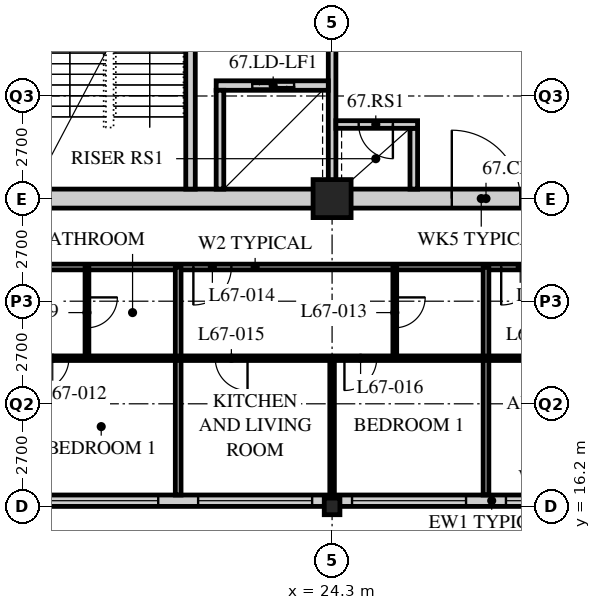
"""IFC4 building model, lengths in metres.
Left out: names, types, materials, properties, quantities, classifications, styles, units other than length and angle.
Written with IfcOpenShell. Run it as: python <this file> out.ifc"""

import sys

from ifc_helpers import new_model, si_unit, direction, frame, frame_2d, origin, origin_2d, place, context, subcontext, project, spatial, rectangle, hollow_rectangle, i_section, extrude, element, fill, save


model = new_model("IFC4")
c1 = context("Model", 3, precision=1e-05, world=origin(), true_north=direction((0.0, 1.0)))
c2 = subcontext(c1, "Body", "Model", "MODEL_VIEW")
j1 = project(units=[si_unit("LENGTHUNIT", "METRE"), si_unit("PLANEANGLEUNIT", "RADIAN")], contexts=[c1])
p1 = place(None, origin())
s1 = spatial("IfcSite", under=j1, at=p1, CompositionType="ELEMENT")
p2 = place(p1, origin())
s2 = spatial("IfcBuilding", under=s1, at=p2, CompositionType="ELEMENT")
p3 = place(p2, frame((0.0, 0.0, 261.9)))
s3 = spatial("IfcBuildingStorey", under=s2, at=p3, CompositionType="ELEMENT", Elevation=261.9)
p4 = place(p3, frame((24.3, 16.2, 0.0), z_axis=(0.0, 0.0, 1.0), x_axis=(1.0, 0.0, 0.0)))
e1 = element("IfcColumn", 1, at=p4, inside=s3, PredefinedType="COLUMN", context=c2, shape_type="SweptSolid", body=[
    extrude(i_section(OverallWidth=0.412, OverallDepth=0.437, WebThickness=0.036, FlangeThickness=0.058, FilletRadius=0.015, at=origin_2d()), origin(), (0.0, 0.0, 1.0), 3.9),
])
p5 = place(p3, frame((24.3, 24.3, 0.0), z_axis=(0.0, 0.0, 1.0), x_axis=(1.0, 0.0, 0.0)))
e2 = element("IfcColumn", 2, at=p5, inside=s3, PredefinedType="COLUMN", context=c2, shape_type="SweptSolid", body=[
    extrude(hollow_rectangle(XDim=1.0, YDim=1.0, WallThickness=0.1, at=origin_2d()), origin(), (0.0, 0.0, 1.0), 3.9),
])
p6 = place(p3, frame((8.4, 16.35, 0.0), z_axis=(0.0, 0.0, 1.0), x_axis=(1.0, 0.0, 0.0)))
e3 = element("IfcWall", 3, at=p6, inside=s3, PredefinedType="SOLIDWALL", context=c2, shape_type="SweptSolid", body=[
    extrude(rectangle(XDim=40.2, YDim=0.3, at=frame_2d((20.1, 0.0))), origin(), (0.0, 0.0, 1.0), 3.69),
])
p7 = place(p6, frame((0.225, 0.0, 0.6)))
e4 = element("IfcOpeningElement", 4, at=p7, cuts=e3, PredefinedType="OPENING", context=c2, shape_type="SweptSolid", body=[
    extrude(rectangle(XDim=3.0, YDim=2.4, at=frame_2d((1.5, 1.2))), frame((0.0, 0.16, 0.0), z_axis=(0.0, -1.0, 0.0), x_axis=(1.0, 0.0, 0.0)), (0.0, 0.0, 1.0), 0.32),
])
p8 = place(p6, frame((4.275, 0.0, 0.6)))
e5 = element("IfcOpeningElement", 5, at=p8, cuts=e3, PredefinedType="OPENING", context=c2, shape_type="SweptSolid", body=[
    extrude(rectangle(XDim=3.0, YDim=2.4, at=frame_2d((1.5, 1.2))), frame((0.0, 0.16, 0.0), z_axis=(0.0, -1.0, 0.0), x_axis=(1.0, 0.0, 0.0)), (0.0, 0.0, 1.0), 0.32),
])
p9 = place(p6, frame((8.325, 0.0, 0.6)))
e6 = element("IfcOpeningElement", 6, at=p9, cuts=e3, PredefinedType="OPENING", context=c2, shape_type="SweptSolid", body=[
    extrude(rectangle(XDim=3.0, YDim=2.4, at=frame_2d((1.5, 1.2))), frame((0.0, 0.16, 0.0), z_axis=(0.0, -1.0, 0.0), x_axis=(1.0, 0.0, 0.0)), (0.0, 0.0, 1.0), 0.32),
])
p10 = place(p6, frame((12.375, 0.0, 0.6)))
e7 = element("IfcOpeningElement", 7, at=p10, cuts=e3, PredefinedType="OPENING", context=c2, shape_type="SweptSolid", body=[
    extrude(rectangle(XDim=3.0, YDim=2.4, at=frame_2d((1.5, 1.2))), frame((0.0, 0.16, 0.0), z_axis=(0.0, -1.0, 0.0), x_axis=(1.0, 0.0, 0.0)), (0.0, 0.0, 1.0), 0.32),
])
p11 = place(p6, frame((16.425, 0.0, 0.6)))
e8 = element("IfcOpeningElement", 8, at=p11, cuts=e3, PredefinedType="OPENING", context=c2, shape_type="SweptSolid", body=[
    extrude(rectangle(XDim=3.0, YDim=2.4, at=frame_2d((1.5, 1.2))), frame((0.0, 0.16, 0.0), z_axis=(0.0, -1.0, 0.0), x_axis=(1.0, 0.0, 0.0)), (0.0, 0.0, 1.0), 0.32),
])
p12 = place(p6, frame((20.475, 0.0, 0.6)))
e9 = element("IfcOpeningElement", 9, at=p12, cuts=e3, PredefinedType="OPENING", context=c2, shape_type="SweptSolid", body=[
    extrude(rectangle(XDim=3.0, YDim=2.4, at=frame_2d((1.5, 1.2))), frame((0.0, 0.16, 0.0), z_axis=(0.0, -1.0, 0.0), x_axis=(1.0, 0.0, 0.0)), (0.0, 0.0, 1.0), 0.32),
])
p13 = place(p6, frame((24.525, 0.0, 0.6)))
e10 = element("IfcOpeningElement", 10, at=p13, cuts=e3, PredefinedType="OPENING", context=c2, shape_type="SweptSolid", body=[
    extrude(rectangle(XDim=3.0, YDim=2.4, at=frame_2d((1.5, 1.2))), frame((0.0, 0.16, 0.0), z_axis=(0.0, -1.0, 0.0), x_axis=(1.0, 0.0, 0.0)), (0.0, 0.0, 1.0), 0.32),
])
p14 = place(p6, frame((28.575, 0.0, 0.6)))
e11 = element("IfcOpeningElement", 11, at=p14, cuts=e3, PredefinedType="OPENING", context=c2, shape_type="SweptSolid", body=[
    extrude(rectangle(XDim=3.0, YDim=2.4, at=frame_2d((1.5, 1.2))), frame((0.0, 0.16, 0.0), z_axis=(0.0, -1.0, 0.0), x_axis=(1.0, 0.0, 0.0)), (0.0, 0.0, 1.0), 0.32),
])
p15 = place(p6, frame((32.625, 0.0, 0.6)))
e12 = element("IfcOpeningElement", 12, at=p15, cuts=e3, PredefinedType="OPENING", context=c2, shape_type="SweptSolid", body=[
    extrude(rectangle(XDim=3.0, YDim=2.4, at=frame_2d((1.5, 1.2))), frame((0.0, 0.16, 0.0), z_axis=(0.0, -1.0, 0.0), x_axis=(1.0, 0.0, 0.0)), (0.0, 0.0, 1.0), 0.32),
])
p16 = place(p6, frame((36.675, 0.0, 0.6)))
e13 = element("IfcOpeningElement", 13, at=p16, cuts=e3, PredefinedType="OPENING", context=c2, shape_type="SweptSolid", body=[
    extrude(rectangle(XDim=3.0, YDim=2.4, at=frame_2d((1.5, 1.2))), frame((0.0, 0.16, 0.0), z_axis=(0.0, -1.0, 0.0), x_axis=(1.0, 0.0, 0.0)), (0.0, 0.0, 1.0), 0.32),
])
p17 = place(p3, frame((8.1, 22.5, 0.0), z_axis=(0.0, 0.0, 1.0), x_axis=(1.0, 0.0, 0.0)))
e14 = element("IfcWall", 14, at=p17, inside=s3, PredefinedType="PARTITIONING", context=c2, shape_type="SweptSolid", body=[
    extrude(rectangle(XDim=28.35, YDim=0.15, at=frame_2d((14.175, 0.0))), origin(), (0.0, 0.0, 1.0), 3.69),
])
p18 = place(p17, frame((4.45, 0.0, 0.0)))
e15 = element("IfcOpeningElement", 15, at=p18, cuts=e14, PredefinedType="OPENING", context=c2, shape_type="SweptSolid", body=[
    extrude(rectangle(XDim=1.0, YDim=2.1, at=frame_2d((0.5, 1.05))), frame((0.0, 0.085, 0.0), z_axis=(0.0, -1.0, 0.0), x_axis=(1.0, 0.0, 0.0)), (0.0, 0.0, 1.0), 0.17),
])
p19 = place(p17, frame((12.55, 0.0, 0.0)))
e16 = element("IfcOpeningElement", 16, at=p19, cuts=e14, PredefinedType="OPENING", context=c2, shape_type="SweptSolid", body=[
    extrude(rectangle(XDim=1.0, YDim=2.1, at=frame_2d((0.5, 1.05))), frame((0.0, 0.085, 0.0), z_axis=(0.0, -1.0, 0.0), x_axis=(1.0, 0.0, 0.0)), (0.0, 0.0, 1.0), 0.17),
])
p20 = place(p17, frame((20.65, 0.0, 0.0)))
e17 = element("IfcOpeningElement", 17, at=p20, cuts=e14, PredefinedType="OPENING", context=c2, shape_type="SweptSolid", body=[
    extrude(rectangle(XDim=1.0, YDim=2.1, at=frame_2d((0.5, 1.05))), frame((0.0, 0.085, 0.0), z_axis=(0.0, -1.0, 0.0), x_axis=(1.0, 0.0, 0.0)), (0.0, 0.0, 1.0), 0.17),
])
p21 = place(p17, frame((2.625, 0.0, 0.0)))
e18 = element("IfcOpeningElement", 18, at=p21, cuts=e14, PredefinedType="OPENING", context=c2, shape_type="SweptSolid", body=[
    extrude(rectangle(XDim=1.0, YDim=2.1, at=frame_2d((0.5, 1.05))), frame((0.0, 0.085, 0.0), z_axis=(0.0, -1.0, 0.0), x_axis=(1.0, 0.0, 0.0)), (0.0, 0.0, 1.0), 0.17),
])
p22 = place(p3, frame((17.85, 22.5, 0.0), z_axis=(0.0, 0.0, 1.0), x_axis=(0.0, -1.0, 0.0)))
e19 = element("IfcWall", 19, at=p22, inside=s3, PredefinedType="PARTITIONING", context=c2, shape_type="SweptSolid", body=[
    extrude(rectangle(XDim=2.4, YDim=0.1, at=frame_2d((1.2, 0.0))), origin(), (0.0, 0.0, 1.0), 3.69),
])
p23 = place(p22, frame((0.8, 0.0, 0.0)))
e20 = element("IfcOpeningElement", 20, at=p23, cuts=e19, PredefinedType="OPENING", context=c2, shape_type="SweptSolid", body=[
    extrude(rectangle(XDim=0.8, YDim=2.1, at=frame_2d((0.4, 1.05))), frame((0.0, 0.06, 0.0), z_axis=(0.0, -1.0, 0.0), x_axis=(1.0, 0.0, 0.0)), (0.0, 0.0, 1.0), 0.12),
])
p24 = place(p3, frame((20.25, 22.5, 0.0), z_axis=(0.0, 0.0, 1.0), x_axis=(0.0, -1.0, 0.0)))
e21 = element("IfcWall", 21, at=p24, inside=s3, PredefinedType="PARTITIONING", context=c2, shape_type="SweptSolid", body=[
    extrude(rectangle(XDim=6.0, YDim=0.15, at=frame_2d((3.0, 0.0))), origin(), (0.0, 0.0, 1.0), 3.69),
])
p25 = place(p3, frame((25.95, 22.5, 0.0), z_axis=(0.0, 0.0, 1.0), x_axis=(0.0, -1.0, 0.0)))
e22 = element("IfcWall", 22, at=p25, inside=s3, PredefinedType="PARTITIONING", context=c2, shape_type="SweptSolid", body=[
    extrude(rectangle(XDim=2.4, YDim=0.1, at=frame_2d((1.2, 0.0))), origin(), (0.0, 0.0, 1.0), 3.69),
])
p26 = place(p25, frame((0.8, 0.0, 0.0)))
e23 = element("IfcOpeningElement", 23, at=p26, cuts=e22, PredefinedType="OPENING", context=c2, shape_type="SweptSolid", body=[
    extrude(rectangle(XDim=0.8, YDim=2.1, at=frame_2d((0.4, 1.05))), frame((0.0, 0.06, 0.0), z_axis=(0.0, -1.0, 0.0), x_axis=(1.0, 0.0, 0.0)), (0.0, 0.0, 1.0), 0.12),
])
p27 = place(p3, frame((24.3, 20.1, 0.0), z_axis=(0.0, 0.0, 1.0), x_axis=(0.0, -1.0, 0.0)))
e24 = element("IfcWall", 24, at=p27, inside=s3, PredefinedType="PARTITIONING", context=c2, shape_type="SweptSolid", body=[
    extrude(rectangle(XDim=3.6, YDim=0.12, at=frame_2d((1.8, 0.0))), origin(), (0.0, 0.0, 1.0), 3.078),
])
p28 = place(p3, frame((28.35, 22.5, 0.0), z_axis=(0.0, 0.0, 1.0), x_axis=(0.0, -1.0, 0.0)))
e25 = element("IfcWall", 25, at=p28, inside=s3, PredefinedType="PARTITIONING", context=c2, shape_type="SweptSolid", body=[
    extrude(rectangle(XDim=6.0, YDim=0.15, at=frame_2d((3.0, 0.0))), origin(), (0.0, 0.0, 1.0), 3.69),
])
p29 = place(p3, frame((8.1, 20.1, 0.0), z_axis=(0.0, 0.0, 1.0), x_axis=(1.0, 0.0, 0.0)))
e26 = element("IfcWall", 26, at=p29, inside=s3, PredefinedType="PARTITIONING", context=c2, shape_type="SweptSolid", body=[
    extrude(rectangle(XDim=28.35, YDim=0.12, at=frame_2d((14.175, 0.0))), origin(), (0.0, 0.0, 1.0), 3.69),
])
p30 = place(p29, frame((5.025, 0.0, 0.0)))
e27 = element("IfcOpeningElement", 27, at=p30, cuts=e26, PredefinedType="OPENING", context=c2, shape_type="SweptSolid", body=[
    extrude(rectangle(XDim=0.85, YDim=2.1, at=frame_2d((0.425, 1.05))), frame((0.0, 0.07, 0.0), z_axis=(0.0, -1.0, 0.0), x_axis=(1.0, 0.0, 0.0)), (0.0, 0.0, 1.0), 0.14),
])
p31 = place(p29, frame((8.425, 0.0, 0.0)))
e28 = element("IfcOpeningElement", 28, at=p31, cuts=e26, PredefinedType="OPENING", context=c2, shape_type="SweptSolid", body=[
    extrude(rectangle(XDim=0.85, YDim=2.1, at=frame_2d((0.425, 1.05))), frame((0.0, 0.07, 0.0), z_axis=(0.0, -1.0, 0.0), x_axis=(1.0, 0.0, 0.0)), (0.0, 0.0, 1.0), 0.14),
])
p32 = place(p29, frame((13.125, 0.0, 0.0)))
e29 = element("IfcOpeningElement", 29, at=p32, cuts=e26, PredefinedType="OPENING", context=c2, shape_type="SweptSolid", body=[
    extrude(rectangle(XDim=0.85, YDim=2.1, at=frame_2d((0.425, 1.05))), frame((0.0, 0.07, 0.0), z_axis=(0.0, -1.0, 0.0), x_axis=(1.0, 0.0, 0.0)), (0.0, 0.0, 1.0), 0.14),
])
p33 = place(p29, frame((16.525, 0.0, 0.0)))
e30 = element("IfcOpeningElement", 30, at=p33, cuts=e26, PredefinedType="OPENING", context=c2, shape_type="SweptSolid", body=[
    extrude(rectangle(XDim=0.85, YDim=2.1, at=frame_2d((0.425, 1.05))), frame((0.0, 0.07, 0.0), z_axis=(0.0, -1.0, 0.0), x_axis=(1.0, 0.0, 0.0)), (0.0, 0.0, 1.0), 0.14),
])
p34 = place(p29, frame((21.225, 0.0, 0.0)))
e31 = element("IfcOpeningElement", 31, at=p34, cuts=e26, PredefinedType="OPENING", context=c2, shape_type="SweptSolid", body=[
    extrude(rectangle(XDim=0.85, YDim=2.1, at=frame_2d((0.425, 1.05))), frame((0.0, 0.07, 0.0), z_axis=(0.0, -1.0, 0.0), x_axis=(1.0, 0.0, 0.0)), (0.0, 0.0, 1.0), 0.14),
])
p35 = place(p29, frame((24.625, 0.0, 0.0)))
e32 = element("IfcOpeningElement", 32, at=p35, cuts=e26, PredefinedType="OPENING", context=c2, shape_type="SweptSolid", body=[
    extrude(rectangle(XDim=0.85, YDim=2.1, at=frame_2d((0.425, 1.05))), frame((0.0, 0.07, 0.0), z_axis=(0.0, -1.0, 0.0), x_axis=(1.0, 0.0, 0.0)), (0.0, 0.0, 1.0), 0.14),
])
p36 = place(p29, frame((2.725, 0.0, 0.0)))
e33 = element("IfcOpeningElement", 33, at=p36, cuts=e26, PredefinedType="OPENING", context=c2, shape_type="SweptSolid", body=[
    extrude(rectangle(XDim=0.85, YDim=2.1, at=frame_2d((0.425, 1.05))), frame((0.0, 0.07, 0.0), z_axis=(0.0, -1.0, 0.0), x_axis=(1.0, 0.0, 0.0)), (0.0, 0.0, 1.0), 0.14),
])
p37 = place(p3, frame((15.95, 24.3, 0.0), z_axis=(0.0, 0.0, 1.0), x_axis=(1.0, 0.0, 0.0)))
e34 = element("IfcWall", 34, at=p37, inside=s3, PredefinedType="SOLIDWALL", context=c2, shape_type="SweptSolid", body=[
    extrude(rectangle(XDim=24.55, YDim=0.5, at=frame_2d((12.275, 0.0))), origin(), (0.0, 0.0, 1.0), 3.04),
])
p38 = place(p37, frame((11.5, 0.0, 0.0)))
e35 = element("IfcOpeningElement", 35, at=p38, cuts=e34, PredefinedType="OPENING", context=c2, shape_type="SweptSolid", body=[
    extrude(rectangle(XDim=1.8, YDim=2.4, at=frame_2d((0.9, 1.2))), frame((0.0, 0.26, 0.0), z_axis=(0.0, -1.0, 0.0), x_axis=(1.0, 0.0, 0.0)), (0.0, 0.0, 1.0), 0.52),
])
p39 = place(p3, frame((24.3, 24.55, 0.0), z_axis=(0.0, 0.0, 1.0), x_axis=(0.0, 1.0, 0.0)))
e36 = element("IfcWall", 36, at=p39, inside=s3, PredefinedType="SOLIDWALL", context=c2, shape_type="SweptSolid", body=[
    extrude(rectangle(XDim=7.75, YDim=0.2, at=frame_2d((3.875, 0.0))), origin(), (0.0, 0.0, 1.0), 3.078),
])
p40 = place(p39, frame((4.6, 0.0, 0.0)))
e37 = element("IfcOpeningElement", 37, at=p40, cuts=e36, PredefinedType="OPENING", context=c2, shape_type="SweptSolid", body=[
    extrude(rectangle(XDim=1.2, YDim=2.1, at=frame_2d((0.6, 1.05))), frame((0.0, 0.11, 0.0), z_axis=(0.0, -1.0, 0.0), x_axis=(1.0, 0.0, 0.0)), (0.0, 0.0, 1.0), 0.22),
])
p41 = place(p3, frame((20.575, 24.55, 0.0), z_axis=(0.0, 0.0, 1.0), x_axis=(0.0, 1.0, 0.0)))
e38 = element("IfcWall", 38, at=p41, inside=s3, PredefinedType="SOLIDWALL", context=c2, shape_type="SweptSolid", body=[
    extrude(rectangle(XDim=7.75, YDim=0.25, at=frame_2d((3.875, 0.0))), origin(), (0.0, 0.0, 1.0), 3.69),
])
p42 = place(p41, frame((6.2, 0.0, 0.0)))
e39 = element("IfcOpeningElement", 39, at=p42, cuts=e38, PredefinedType="OPENING", context=c2, shape_type="SweptSolid", body=[
    extrude(rectangle(XDim=1.2, YDim=2.1, at=frame_2d((0.6, 1.05))), frame((0.0, 0.135, 0.0), z_axis=(0.0, -1.0, 0.0), x_axis=(1.0, 0.0, 0.0)), (0.0, 0.0, 1.0), 0.27),
])
p43 = place(p3, frame((21.25, 27.275, 0.0), z_axis=(0.0, 0.0, 1.0), x_axis=(1.0, 0.0, 0.0)))
e40 = element("IfcWall", 40, at=p43, inside=s3, PredefinedType="SOLIDWALL", context=c2, shape_type="SweptSolid", body=[
    extrude(rectangle(XDim=2.95, YDim=0.25, at=frame_2d((1.475, 0.0))), origin(), (0.0, 0.0, 1.0), 3.69),
])
p44 = place(p43, frame((0.95, 0.0, 0.0)))
e41 = element("IfcOpeningElement", 41, at=p44, cuts=e40, PredefinedType="OPENING", context=c2, shape_type="SweptSolid", body=[
    extrude(rectangle(XDim=1.1, YDim=2.4, at=frame_2d((0.55, 1.2))), frame((0.0, 0.135, 0.0), z_axis=(0.0, -1.0, 0.0), x_axis=(1.0, 0.0, 0.0)), (0.0, 0.0, 1.0), 0.27),
])
p45 = place(p3, frame((21.35, 24.55, 0.0), z_axis=(0.0, 0.0, 1.0), x_axis=(0.0, 1.0, 0.0)))
e42 = element("IfcWall", 42, at=p45, inside=s3, PredefinedType="SOLIDWALL", context=c2, shape_type="SweptSolid", body=[
    extrude(rectangle(XDim=2.6, YDim=0.2, at=frame_2d((1.3, 0.0))), origin(), (0.0, 0.0, 1.0), 3.69),
])
p46 = place(p3, frame((26.45, 24.55, 0.0), z_axis=(0.0, 0.0, 1.0), x_axis=(0.0, 1.0, 0.0)))
e43 = element("IfcWall", 43, at=p46, inside=s3, PredefinedType="SOLIDWALL", context=c2, shape_type="SweptSolid", body=[
    extrude(rectangle(XDim=1.6, YDim=0.2, at=frame_2d((0.8, 0.0))), origin(), (0.0, 0.0, 1.0), 3.69),
])
p47 = place(p3, frame((24.4, 26.25, 0.0), z_axis=(0.0, 0.0, 1.0), x_axis=(1.0, 0.0, 0.0)))
e44 = element("IfcWall", 44, at=p47, inside=s3, PredefinedType="SOLIDWALL", context=c2, shape_type="SweptSolid", body=[
    extrude(rectangle(XDim=2.15, YDim=0.2, at=frame_2d((1.075, 0.0))), origin(), (0.0, 0.0, 1.0), 3.69),
])
p48 = place(p47, frame((0.6, 0.0, 0.0)))
e45 = element("IfcOpeningElement", 45, at=p48, cuts=e44, PredefinedType="OPENING", context=c2, shape_type="SweptSolid", body=[
    extrude(rectangle(XDim=0.9, YDim=2.1, at=frame_2d((0.45, 1.05))), frame((0.0, 0.11, 0.0), z_axis=(0.0, -1.0, 0.0), x_axis=(1.0, 0.0, 0.0)), (0.0, 0.0, 1.0), 0.22),
])
p49 = place(p9, origin())
e46 = element("IfcWindow", 46, at=p49, inside=s3, PartitioningType="SINGLE_PANEL", PredefinedType="WINDOW", context=c2, shape_type="SweptSolid", body=[
    extrude(rectangle(XDim=3.0, YDim=2.4, at=frame_2d((1.5, 1.2))), frame((0.0, 0.03, 0.0), z_axis=(0.0, -1.0, 0.0), x_axis=(1.0, 0.0, 0.0)), (0.0, 0.0, 1.0), 0.06),
])
fill(e6, e46)
p50 = place(p10, origin())
e47 = element("IfcWindow", 47, at=p50, inside=s3, PartitioningType="SINGLE_PANEL", PredefinedType="WINDOW", context=c2, shape_type="SweptSolid", body=[
    extrude(rectangle(XDim=3.0, YDim=2.4, at=frame_2d((1.5, 1.2))), frame((0.0, 0.03, 0.0), z_axis=(0.0, -1.0, 0.0), x_axis=(1.0, 0.0, 0.0)), (0.0, 0.0, 1.0), 0.06),
])
fill(e7, e47)
p51 = place(p11, origin())
e48 = element("IfcWindow", 48, at=p51, inside=s3, PartitioningType="SINGLE_PANEL", PredefinedType="WINDOW", context=c2, shape_type="SweptSolid", body=[
    extrude(rectangle(XDim=3.0, YDim=2.4, at=frame_2d((1.5, 1.2))), frame((0.0, 0.03, 0.0), z_axis=(0.0, -1.0, 0.0), x_axis=(1.0, 0.0, 0.0)), (0.0, 0.0, 1.0), 0.06),
])
fill(e8, e48)
p52 = place(p12, origin())
e49 = element("IfcWindow", 49, at=p52, inside=s3, PartitioningType="SINGLE_PANEL", PredefinedType="WINDOW", context=c2, shape_type="SweptSolid", body=[
    extrude(rectangle(XDim=3.0, YDim=2.4, at=frame_2d((1.5, 1.2))), frame((0.0, 0.03, 0.0), z_axis=(0.0, -1.0, 0.0), x_axis=(1.0, 0.0, 0.0)), (0.0, 0.0, 1.0), 0.06),
])
fill(e9, e49)
p53 = place(p23, origin())
e50 = element("IfcDoor", 50, at=p53, inside=s3, OperationType="SINGLE_SWING_LEFT", PredefinedType="DOOR", context=c2, shape_type="SweptSolid", body=[
    extrude(rectangle(XDim=0.8, YDim=2.1, at=frame_2d((0.4, 1.05))), frame((0.0, 0.025, 0.0), z_axis=(0.0, -1.0, 0.0), x_axis=(1.0, 0.0, 0.0)), (0.0, 0.0, 1.0), 0.05),
])
fill(e20, e50)
p54 = place(p31, origin())
e51 = element("IfcDoor", 51, at=p54, inside=s3, OperationType="SINGLE_SWING_RIGHT", PredefinedType="DOOR", context=c2, shape_type="SweptSolid", body=[
    extrude(rectangle(XDim=0.85, YDim=2.1, at=frame_2d((0.425, 1.05))), frame((0.0, 0.025, 0.0), z_axis=(0.0, -1.0, 0.0), x_axis=(1.0, 0.0, 0.0)), (0.0, 0.0, 1.0), 0.05),
])
fill(e28, e51)
p55 = place(p26, origin())
e52 = element("IfcDoor", 52, at=p55, inside=s3, OperationType="SINGLE_SWING_LEFT", PredefinedType="DOOR", context=c2, shape_type="SweptSolid", body=[
    extrude(rectangle(XDim=0.8, YDim=2.1, at=frame_2d((0.4, 1.05))), frame((0.0, 0.025, 0.0), z_axis=(0.0, -1.0, 0.0), x_axis=(1.0, 0.0, 0.0)), (0.0, 0.0, 1.0), 0.05),
])
fill(e23, e52)
p56 = place(p19, origin())
e53 = element("IfcDoor", 53, at=p56, inside=s3, OperationType="SINGLE_SWING_RIGHT", PredefinedType="DOOR", context=c2, shape_type="SweptSolid", body=[
    extrude(rectangle(XDim=1.0, YDim=2.1, at=frame_2d((0.5, 1.05))), frame((0.0, 0.025, 0.0), z_axis=(0.0, -1.0, 0.0), x_axis=(1.0, 0.0, 0.0)), (0.0, 0.0, 1.0), 0.05),
])
fill(e16, e53)
p57 = place(p32, origin())
e54 = element("IfcDoor", 54, at=p57, inside=s3, OperationType="SINGLE_SWING_LEFT", PredefinedType="DOOR", context=c2, shape_type="SweptSolid", body=[
    extrude(rectangle(XDim=0.85, YDim=2.1, at=frame_2d((0.425, 1.05))), frame((0.0, 0.025, 0.0), z_axis=(0.0, -1.0, 0.0), x_axis=(1.0, 0.0, 0.0)), (0.0, 0.0, 1.0), 0.05),
])
fill(e29, e54)
p58 = place(p33, origin())
e55 = element("IfcDoor", 55, at=p58, inside=s3, OperationType="SINGLE_SWING_RIGHT", PredefinedType="DOOR", context=c2, shape_type="SweptSolid", body=[
    extrude(rectangle(XDim=0.85, YDim=2.1, at=frame_2d((0.425, 1.05))), frame((0.0, 0.025, 0.0), z_axis=(0.0, -1.0, 0.0), x_axis=(1.0, 0.0, 0.0)), (0.0, 0.0, 1.0), 0.05),
])
fill(e30, e55)
p59 = place(p20, origin())
e56 = element("IfcDoor", 56, at=p59, inside=s3, OperationType="SINGLE_SWING_RIGHT", PredefinedType="DOOR", context=c2, shape_type="SweptSolid", body=[
    extrude(rectangle(XDim=1.0, YDim=2.1, at=frame_2d((0.5, 1.05))), frame((0.0, 0.025, 0.0), z_axis=(0.0, -1.0, 0.0), x_axis=(1.0, 0.0, 0.0)), (0.0, 0.0, 1.0), 0.05),
])
fill(e17, e56)
p60 = place(p48, origin())
e57 = element("IfcDoor", 57, at=p60, inside=s3, OperationType="SINGLE_SWING_LEFT", PredefinedType="DOOR", context=c2, shape_type="SweptSolid", body=[
    extrude(rectangle(XDim=0.9, YDim=2.1, at=frame_2d((0.45, 1.05))), frame((0.0, 0.025, 0.0), z_axis=(0.0, -1.0, 0.0), x_axis=(1.0, 0.0, 0.0)), (0.0, 0.0, 1.0), 0.05),
])
fill(e45, e57)
p61 = place(p44, origin())
e58 = element("IfcDoor", 58, at=p61, inside=s3, OperationType="DOUBLE_DOOR_SLIDING", PredefinedType="DOOR", context=c2, shape_type="SweptSolid", body=[
    extrude(rectangle(XDim=1.1, YDim=2.4, at=frame_2d((0.55, 1.2))), frame((0.0, 0.025, 0.0), z_axis=(0.0, -1.0, 0.0), x_axis=(1.0, 0.0, 0.0)), (0.0, 0.0, 1.0), 0.05),
])
fill(e41, e58)
p62 = place(p38, origin())
e59 = element("IfcDoor", 59, at=p62, inside=s3, OperationType="DOUBLE_DOOR_SINGLE_SWING", PredefinedType="DOOR", context=c2, shape_type="SweptSolid", body=[
    extrude(rectangle(XDim=1.8, YDim=2.4, at=frame_2d((0.9, 1.2))), frame((0.0, 0.025, 0.0), z_axis=(0.0, -1.0, 0.0), x_axis=(1.0, 0.0, 0.0)), (0.0, 0.0, 1.0), 0.05),
])
fill(e35, e59)
save(model, sys.argv[1])
